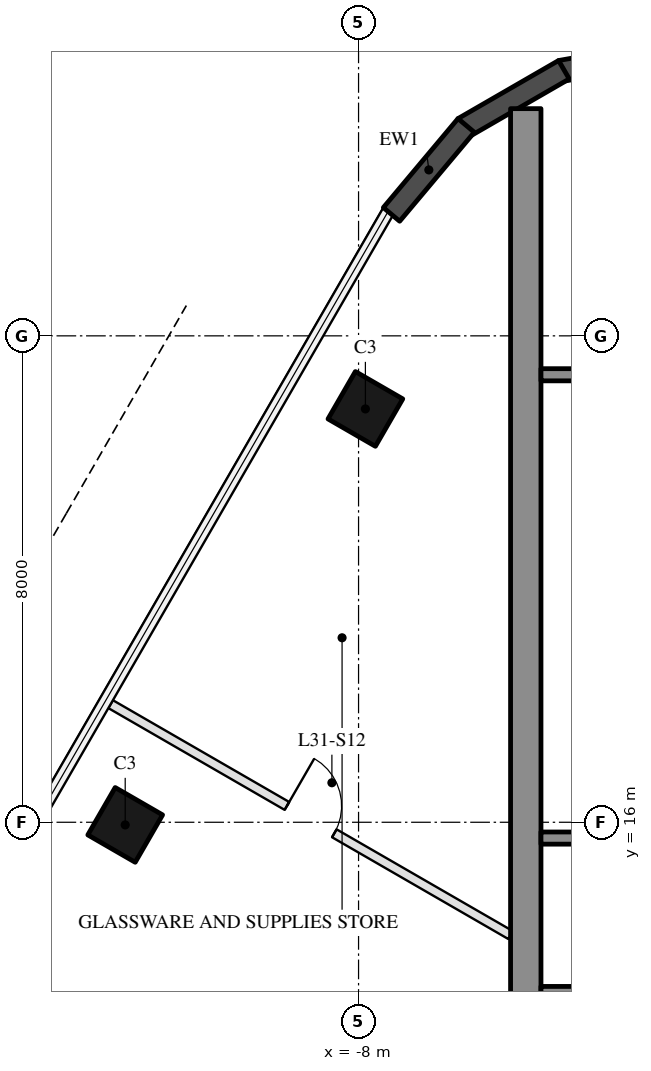
"""IFC4 building model, lengths in metres.
Left out: names, types, materials, properties, quantities, classifications, styles, units other than length and angle.
Written with IfcOpenShell. Run it as: python <this file> out.ifc"""

import sys

from ifc_helpers import new_model, si_unit, direction, frame, frame_2d, origin, origin_2d, place, context, subcontext, project, spatial, rectangle, hollow_rectangle, extrude, element, fill, save


model = new_model("IFC4")
c1 = context("Model", 3, precision=1e-05, world=origin(), true_north=direction((0.0, 1.0)))
c2 = subcontext(c1, "Body", "Model", "MODEL_VIEW")
j1 = project(units=[si_unit("LENGTHUNIT", "METRE"), si_unit("PLANEANGLEUNIT", "RADIAN")], contexts=[c1])
p1 = place(None, origin())
s1 = spatial("IfcSite", under=j1, at=p1, CompositionType="ELEMENT")
p2 = place(p1, origin())
s2 = spatial("IfcBuilding", under=s1, at=p2, CompositionType="ELEMENT")
p3 = place(p2, frame((0.0, 0.0, 131.6)))
s3 = spatial("IfcBuildingStorey", under=s2, at=p3, CompositionType="ELEMENT", Elevation=131.6)
for number, where, z_axis, x_axis in (
    (1, (-7.888, 22.798, 0.0), (0.0, 0.0, 1.0), (0.5, 0.866, 0.0)),
    (2, (-11.838, 15.957, 0.0), (0.0, 0.0, 1.0), (0.5, 0.866, 0.0)),
):
    element("IfcColumn", number, at=place(p3, frame(where, z_axis=z_axis, x_axis=x_axis)), inside=s3, PredefinedType="COLUMN", context=c2, shape_type="SweptSolid", body=[
        extrude(hollow_rectangle(XDim=0.9, YDim=0.9, WallThickness=0.04, at=origin_2d()), origin(), (0.0, 0.0, 1.0), 6.0),
    ])
for number, where, z_axis, x_axis in (
    (3, (-2.799, 28.688, 0.0), (0.0, 0.0, 1.0), (-0.985, -0.174, 0.0)),
    (4, (-4.623, 28.377, 0.0), (0.0, 0.0, 1.0), (-0.866, -0.5, 0.0)),
):
    element("IfcWall", number, at=place(p3, frame(where, z_axis=z_axis, x_axis=x_axis)), inside=s3, PredefinedType="SOLIDWALL", context=c2, shape_type="SweptSolid", body=[
        extrude(rectangle(XDim=1.91, YDim=0.35, at=frame_2d((0.955, 0.0))), origin(), (0.0, 0.0, 1.0), 5.7),
    ])
p4 = place(p3, frame((-6.23, 27.461, 0.0), z_axis=(0.0, 0.0, 1.0), x_axis=(-0.642808304945, -0.766027077259, 0.0)))
e5 = element("IfcWall", 5, at=p4, inside=s3, PredefinedType="SOLIDWALL", context=c2, shape_type="SweptSolid", body=[
    extrude(rectangle(XDim=1.91, YDim=0.35, at=frame_2d((0.955, 0.0))), origin(), (0.0, 0.0, 1.0), 5.7),
])
p5 = place(p3, frame((-5.25, 12.9, 0.0), z_axis=(0.0, 0.0, 1.0), x_axis=(0.0, 1.0, 0.0)))
e6 = element("IfcWall", 6, at=p5, inside=s3, PredefinedType="SHEAR", context=c2, shape_type="SweptSolid", body=[
    extrude(rectangle(XDim=14.837, YDim=0.5, at=frame_2d((7.418, 0.0))), origin(), (0.0, 0.0, 1.0), 5.7),
])
for number, where, z_axis, x_axis in (
    (7, (-3.0, 15.74, 0.0), (0.0, 0.0, 1.0), (-1.0, 0.0, 0.0)),
    (8, (-3.0, 23.36, 0.0), (0.0, 0.0, 1.0), (-1.0, 0.0, 0.0)),
):
    element("IfcWall", number, at=place(p3, frame(where, z_axis=z_axis, x_axis=x_axis)), inside=s3, PredefinedType="SHEAR", context=c2, shape_type="SweptSolid", body=[
        extrude(rectangle(XDim=2.0, YDim=0.2, at=frame_2d((1.0, 0.0))), origin(), (0.0, 0.0, 1.0), 5.7),
    ])
p6 = place(p3, frame((2.45, 13.1, 0.0), z_axis=(0.0, 0.0, 1.0), x_axis=(-1.0, 0.0, 0.0)))
e9 = element("IfcWall", 9, at=p6, inside=s3, PredefinedType="SHEAR", context=c2, shape_type="SweptSolid", body=[
    extrude(rectangle(XDim=7.45, YDim=0.4, at=frame_2d((3.725, 0.0))), origin(), (0.0, 0.0, 1.0), 5.7),
])
p7 = place(p6, frame((1.0, 0.0, 0.0)))
e10 = element("IfcOpeningElement", 10, at=p7, cuts=e9, PredefinedType="OPENING", context=c2, shape_type="SweptSolid", body=[
    extrude(rectangle(XDim=1.1, YDim=2.1, at=frame_2d((0.55, 1.05))), frame((0.0, 0.21, 0.0), z_axis=(0.0, -1.0, 0.0), x_axis=(1.0, 0.0, 0.0)), (0.0, 0.0, 1.0), 0.42),
])
p8 = place(p6, frame((3.3, 0.0, 0.0)))
e11 = element("IfcOpeningElement", 11, at=p8, cuts=e9, PredefinedType="OPENING", context=c2, shape_type="SweptSolid", body=[
    extrude(rectangle(XDim=1.4, YDim=2.1, at=frame_2d((0.7, 1.05))), frame((0.0, 0.21, 0.0), z_axis=(0.0, -1.0, 0.0), x_axis=(1.0, 0.0, 0.0)), (0.0, 0.0, 1.0), 0.42),
])
p9 = place(p3, frame((-12.077, 17.942, 0.0), z_axis=(0.0, 0.0, 1.0), x_axis=(0.866028729371, -0.499994239872, 0.0)))
e12 = element("IfcWall", 12, at=p9, inside=s3, PredefinedType="PARTITIONING", context=c2, shape_type="SweptSolid", body=[
    extrude(rectangle(XDim=7.594, YDim=0.15, at=frame_2d((3.797, 0.0))), origin(), (0.0, 0.0, 1.0), 5.7),
])
p10 = place(p9, frame((3.347, 0.0, 0.0)))
e13 = element("IfcOpeningElement", 13, at=p10, cuts=e12, PredefinedType="OPENING", context=c2, shape_type="SweptSolid", body=[
    extrude(rectangle(XDim=0.9, YDim=2.1, at=frame_2d((0.45, 1.05))), frame((0.0, 0.085, 0.0), z_axis=(0.0, -1.0, 0.0), x_axis=(1.0, 0.0, 0.0)), (0.0, 0.0, 1.0), 0.17),
])
p11 = place(p10, origin())
e14 = element("IfcDoor", 14, at=p11, inside=s3, OperationType="SINGLE_SWING_LEFT", PredefinedType="DOOR", context=c2, shape_type="SweptSolid", body=[
    extrude(rectangle(XDim=0.9, YDim=2.1, at=frame_2d((0.45, 1.05))), frame((0.0, 0.025, 0.0), z_axis=(0.0, -1.0, 0.0), x_axis=(1.0, 0.0, 0.0)), (0.0, 0.0, 1.0), 0.05),
])
fill(e13, e14)
save(model, sys.argv[1])
